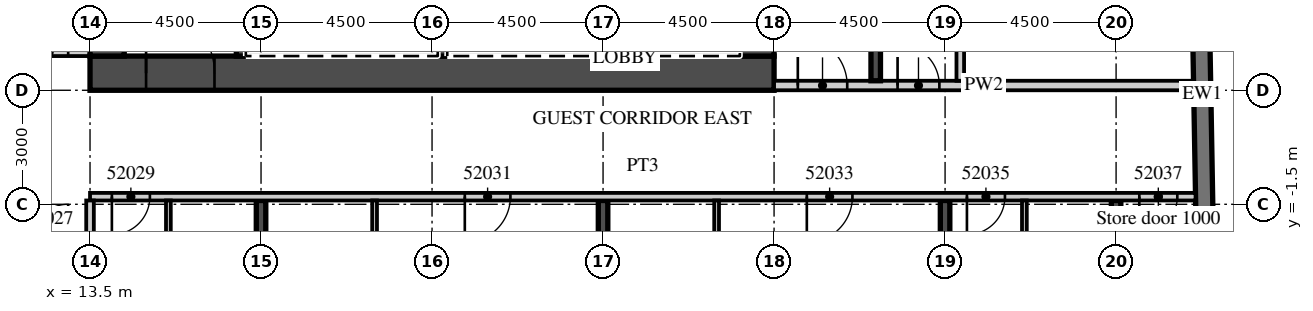
"""IFC4 building model, lengths in metres.
Left out: names, types, materials, properties, quantities, classifications, styles, units other than length and angle.
Written with IfcOpenShell. Run it as: python <this file> out.ifc"""

import sys

from ifc_helpers import new_model, si_unit, direction, frame, frame_2d, origin, place, context, subcontext, project, spatial, rectangle, extrude, element, fill, save


model = new_model("IFC4")
c1 = context("Model", 3, precision=1e-05, world=origin(), true_north=direction((0.0, 1.0)))
c2 = subcontext(c1, "Body", "Model", "MODEL_VIEW")
j1 = project(units=[si_unit("LENGTHUNIT", "METRE"), si_unit("PLANEANGLEUNIT", "RADIAN")], contexts=[c1])
p1 = place(None, origin())
s1 = spatial("IfcSite", under=j1, at=p1, CompositionType="ELEMENT")
p2 = place(p1, origin())
s2 = spatial("IfcBuilding", under=s1, at=p2, CompositionType="ELEMENT")
p3 = place(p2, frame((0.0, 0.0, 217.7)))
s3 = spatial("IfcBuildingStorey", under=s2, at=p3, CompositionType="ELEMENT", Elevation=217.7)
p4 = place(p3, frame((18.0, -19.079, 0.0), z_axis=(0.0, 0.0, 1.0), x_axis=(0.0, 1.0, 0.0)))
e1 = element("IfcWall", 1, at=p4, inside=s3, PredefinedType="SHEAR", context=c2, shape_type="SweptSolid", body=[
    extrude(rectangle(XDim=17.679, YDim=0.25, at=frame_2d((8.84, 0.0))), origin(), (0.0, 0.0, 1.0), 3.3),
])
p5 = place(p3, frame((27.0, -18.922, 0.0), z_axis=(0.0, 0.0, 1.0), x_axis=(0.0, 1.0, 0.0)))
e2 = element("IfcWall", 2, at=p5, inside=s3, PredefinedType="SHEAR", context=c2, shape_type="SweptSolid", body=[
    extrude(rectangle(XDim=17.522, YDim=0.25, at=frame_2d((8.761, 0.0))), origin(), (0.0, 0.0, 1.0), 3.3),
])
p6 = place(p3, frame((36.0, -18.765, 0.0), z_axis=(0.0, 0.0, 1.0), x_axis=(0.0, 1.0, 0.0)))
e3 = element("IfcWall", 3, at=p6, inside=s3, PredefinedType="SHEAR", context=c2, shape_type="SweptSolid", body=[
    extrude(rectangle(XDim=17.365, YDim=0.25, at=frame_2d((8.683, 0.0))), origin(), (0.0, 0.0, 1.0), 3.3),
])
p7 = place(p3, frame((40.5, -18.325, 0.0), z_axis=(0.0, 0.0, 1.0), x_axis=(0.0, 1.0, 0.0)))
e4 = element("IfcWall", 4, at=p7, inside=s3, PredefinedType="SHEAR", context=c2, shape_type="SweptSolid", body=[
    extrude(rectangle(XDim=16.925, YDim=0.25, at=frame_2d((8.463, 0.0))), origin(), (0.0, 0.0, 1.0), 3.3),
])
p8 = place(p3, frame((43.057, -15.103, 0.0), z_axis=(0.0, 0.0, 1.0), x_axis=(-0.017452408953, 0.999847695112, 0.0)))
e5 = element("IfcWall", 5, at=p8, inside=s3, PredefinedType="SOLIDWALL", context=c2, shape_type="SweptSolid", body=[
    extrude(rectangle(XDim=33.0, YDim=0.45, at=frame_2d((16.5, 0.0))), origin(), (0.0, 0.0, 1.0), 3.02),
])
p9 = place(p3, frame((-13.5, 2.5, 0.0), z_axis=(0.0, 0.0, 1.0), x_axis=(1.0, 0.0, 0.0)))
e6 = element("IfcWall", 6, at=p9, inside=s3, PredefinedType="PARTITIONING", context=c2, shape_type="SweptSolid", body=[
    extrude(rectangle(XDim=27.0, YDim=0.2, at=frame_2d((13.5, 0.0))), origin(), (0.0, 0.0, 1.0), 3.02),
])
p10 = place(p9, frame((2.925, 0.0, 0.0)))
e7 = element("IfcOpeningElement", 7, at=p10, cuts=e6, PredefinedType="OPENING", context=c2, shape_type="SweptSolid", body=[
    extrude(rectangle(XDim=1.0, YDim=2.1, at=frame_2d((0.5, 1.05))), frame((0.0, 0.11, 0.0), z_axis=(0.0, -1.0, 0.0), x_axis=(1.0, 0.0, 0.0)), (0.0, 0.0, 1.0), 0.22),
])
p11 = place(p9, frame((7.45, 0.0, 0.0)))
e8 = element("IfcOpeningElement", 8, at=p11, cuts=e6, PredefinedType="OPENING", context=c2, shape_type="SweptSolid", body=[
    extrude(rectangle(XDim=1.0, YDim=2.1, at=frame_2d((0.5, 1.05))), frame((0.0, 0.11, 0.0), z_axis=(0.0, -1.0, 0.0), x_axis=(1.0, 0.0, 0.0)), (0.0, 0.0, 1.0), 0.22),
])
p12 = place(p9, frame((11.925, 0.0, 0.0)))
e9 = element("IfcOpeningElement", 9, at=p12, cuts=e6, PredefinedType="OPENING", context=c2, shape_type="SweptSolid", body=[
    extrude(rectangle(XDim=1.0, YDim=2.1, at=frame_2d((0.5, 1.05))), frame((0.0, 0.11, 0.0), z_axis=(0.0, -1.0, 0.0), x_axis=(1.0, 0.0, 0.0)), (0.0, 0.0, 1.0), 0.22),
])
p13 = place(p9, frame((14.075, 0.0, 0.0)))
e10 = element("IfcOpeningElement", 10, at=p13, cuts=e6, PredefinedType="OPENING", context=c2, shape_type="SweptSolid", body=[
    extrude(rectangle(XDim=1.0, YDim=2.1, at=frame_2d((0.5, 1.05))), frame((0.0, 0.11, 0.0), z_axis=(0.0, -1.0, 0.0), x_axis=(1.0, 0.0, 0.0)), (0.0, 0.0, 1.0), 0.22),
])
p14 = place(p9, frame((20.925, 0.0, 0.0)))
e11 = element("IfcOpeningElement", 11, at=p14, cuts=e6, PredefinedType="OPENING", context=c2, shape_type="SweptSolid", body=[
    extrude(rectangle(XDim=1.0, YDim=2.1, at=frame_2d((0.5, 1.05))), frame((0.0, 0.11, 0.0), z_axis=(0.0, -1.0, 0.0), x_axis=(1.0, 0.0, 0.0)), (0.0, 0.0, 1.0), 0.22),
])
p15 = place(p9, frame((25.425, 0.0, 0.0)))
e12 = element("IfcOpeningElement", 12, at=p15, cuts=e6, PredefinedType="OPENING", context=c2, shape_type="SweptSolid", body=[
    extrude(rectangle(XDim=1.0, YDim=2.1, at=frame_2d((0.5, 1.05))), frame((0.0, 0.11, 0.0), z_axis=(0.0, -1.0, 0.0), x_axis=(1.0, 0.0, 0.0)), (0.0, 0.0, 1.0), 0.22),
])
p16 = place(p3, frame((13.5, -1.3, 0.0), z_axis=(0.0, 0.0, 1.0), x_axis=(1.0, 0.0, 0.0)))
e13 = element("IfcWall", 13, at=p16, inside=s3, PredefinedType="PARTITIONING", context=c2, shape_type="SweptSolid", body=[
    extrude(rectangle(XDim=29.091, YDim=0.2, at=frame_2d((14.545, 0.0))), origin(), (0.0, 0.0, 1.0), 3.02),
])
p17 = place(p16, frame((0.575, 0.0, 0.0)))
e14 = element("IfcOpeningElement", 14, at=p17, cuts=e13, PredefinedType="OPENING", context=c2, shape_type="SweptSolid", body=[
    extrude(rectangle(XDim=1.0, YDim=2.1, at=frame_2d((0.5, 1.05))), frame((0.0, 0.11, 0.0), z_axis=(0.0, -1.0, 0.0), x_axis=(1.0, 0.0, 0.0)), (0.0, 0.0, 1.0), 0.22),
])
p18 = place(p16, frame((9.862, 0.0, 0.0)))
e15 = element("IfcOpeningElement", 15, at=p18, cuts=e13, PredefinedType="OPENING", context=c2, shape_type="SweptSolid", body=[
    extrude(rectangle(XDim=1.2, YDim=2.1, at=frame_2d((0.6, 1.05))), frame((0.0, 0.11, 0.0), z_axis=(0.0, -1.0, 0.0), x_axis=(1.0, 0.0, 0.0)), (0.0, 0.0, 1.0), 0.22),
])
p19 = place(p16, frame((18.862, 0.0, 0.0)))
e16 = element("IfcOpeningElement", 16, at=p19, cuts=e13, PredefinedType="OPENING", context=c2, shape_type="SweptSolid", body=[
    extrude(rectangle(XDim=1.2, YDim=2.1, at=frame_2d((0.6, 1.05))), frame((0.0, 0.11, 0.0), z_axis=(0.0, -1.0, 0.0), x_axis=(1.0, 0.0, 0.0)), (0.0, 0.0, 1.0), 0.22),
])
p20 = place(p16, frame((23.075, 0.0, 0.0)))
e17 = element("IfcOpeningElement", 17, at=p20, cuts=e13, PredefinedType="OPENING", context=c2, shape_type="SweptSolid", body=[
    extrude(rectangle(XDim=1.0, YDim=2.1, at=frame_2d((0.5, 1.05))), frame((0.0, 0.11, 0.0), z_axis=(0.0, -1.0, 0.0), x_axis=(1.0, 0.0, 0.0)), (0.0, 0.0, 1.0), 0.22),
])
p21 = place(p16, frame((27.611, 0.0, 0.0)))
e18 = element("IfcOpeningElement", 18, at=p21, cuts=e13, PredefinedType="OPENING", context=c2, shape_type="SweptSolid", body=[
    extrude(rectangle(XDim=1.0, YDim=2.4, at=frame_2d((0.5, 1.2))), frame((0.0, 0.11, 0.0), z_axis=(0.0, -1.0, 0.0), x_axis=(1.0, 0.0, 0.0)), (0.0, 0.0, 1.0), 0.22),
])
p22 = place(p3, frame((13.5, -19.17, 0.0), z_axis=(0.0, 0.0, 1.0), x_axis=(0.0, 1.0, 0.0)))
e19 = element("IfcWall", 19, at=p22, inside=s3, PredefinedType="PARTITIONING", context=c2, shape_type="SweptSolid", body=[
    extrude(rectangle(XDim=17.77, YDim=0.2, at=frame_2d((8.885, 0.0))), origin(), (0.0, 0.0, 1.0), 3.02),
])
p23 = place(p3, frame((15.562, -8.125, 0.0), z_axis=(0.0, 0.0, 1.0), x_axis=(0.0, 1.0, 0.0)))
e20 = element("IfcWall", 20, at=p23, inside=s3, PredefinedType="PARTITIONING", context=c2, shape_type="SweptSolid", body=[
    extrude(rectangle(XDim=6.725, YDim=0.125, at=frame_2d((3.363, 0.0))), origin(), (0.0, 0.0, 1.0), 3.02),
])
p24 = place(p23, frame((3.375, 0.0, 0.0)))
e21 = element("IfcOpeningElement", 21, at=p24, cuts=e20, PredefinedType="OPENING", context=c2, shape_type="SweptSolid", body=[
    extrude(rectangle(XDim=0.9, YDim=2.1, at=frame_2d((0.45, 1.05))), frame((0.0, 0.073, 0.0), z_axis=(0.0, -1.0, 0.0), x_axis=(1.0, 0.0, 0.0)), (0.0, 0.0, 1.0), 0.145),
])
p25 = place(p3, frame((20.988, -8.125, 0.0), z_axis=(0.0, 0.0, 1.0), x_axis=(0.0, 1.0, 0.0)))
e22 = element("IfcWall", 22, at=p25, inside=s3, PredefinedType="PARTITIONING", context=c2, shape_type="SweptSolid", body=[
    extrude(rectangle(XDim=6.725, YDim=0.125, at=frame_2d((3.363, 0.0))), origin(), (0.0, 0.0, 1.0), 3.02),
])
p26 = place(p25, frame((3.375, 0.0, 0.0)))
e23 = element("IfcOpeningElement", 23, at=p26, cuts=e22, PredefinedType="OPENING", context=c2, shape_type="SweptSolid", body=[
    extrude(rectangle(XDim=0.9, YDim=2.1, at=frame_2d((0.45, 1.05))), frame((0.0, 0.073, 0.0), z_axis=(0.0, -1.0, 0.0), x_axis=(1.0, 0.0, 0.0)), (0.0, 0.0, 1.0), 0.145),
])
p27 = place(p3, frame((29.988, -8.125, 0.0), z_axis=(0.0, 0.0, 1.0), x_axis=(0.0, 1.0, 0.0)))
e24 = element("IfcWall", 24, at=p27, inside=s3, PredefinedType="PARTITIONING", context=c2, shape_type="SweptSolid", body=[
    extrude(rectangle(XDim=6.725, YDim=0.125, at=frame_2d((3.363, 0.0))), origin(), (0.0, 0.0, 1.0), 3.02),
])
p28 = place(p27, frame((3.375, 0.0, 0.0)))
e25 = element("IfcOpeningElement", 25, at=p28, cuts=e24, PredefinedType="OPENING", context=c2, shape_type="SweptSolid", body=[
    extrude(rectangle(XDim=0.9, YDim=2.1, at=frame_2d((0.45, 1.05))), frame((0.0, 0.073, 0.0), z_axis=(0.0, -1.0, 0.0), x_axis=(1.0, 0.0, 0.0)), (0.0, 0.0, 1.0), 0.145),
])
p29 = place(p3, frame((38.087, -8.125, 0.0), z_axis=(0.0, 0.0, 1.0), x_axis=(0.0, 1.0, 0.0)))
e26 = element("IfcWall", 26, at=p29, inside=s3, PredefinedType="PARTITIONING", context=c2, shape_type="SweptSolid", body=[
    extrude(rectangle(XDim=6.725, YDim=0.125, at=frame_2d((3.363, 0.0))), origin(), (0.0, 0.0, 1.0), 3.02),
])
p30 = place(p29, frame((3.375, 0.0, 0.0)))
e27 = element("IfcOpeningElement", 27, at=p30, cuts=e26, PredefinedType="OPENING", context=c2, shape_type="SweptSolid", body=[
    extrude(rectangle(XDim=0.9, YDim=2.1, at=frame_2d((0.45, 1.05))), frame((0.0, 0.073, 0.0), z_axis=(0.0, -1.0, 0.0), x_axis=(1.0, 0.0, 0.0)), (0.0, 0.0, 1.0), 0.145),
])
p31 = place(p3, frame((13.5, 1.95, 0.0), z_axis=(0.0, 0.0, 1.0), x_axis=(1.0, 0.0, 0.0)))
e28 = element("IfcWall", 28, at=p31, inside=s3, PredefinedType="SHEAR", context=c2, shape_type="SweptSolid", body=[
    extrude(rectangle(XDim=18.0, YDim=0.9, at=frame_2d((9.0, 0.0))), origin(), (0.0, 0.0, 1.0), 3.02),
])
p32 = place(p31, frame((1.475, 0.0, 0.0)))
e29 = element("IfcOpeningElement", 29, at=p32, cuts=e28, PredefinedType="OPENING", context=c2, shape_type="SweptSolid", body=[
    extrude(rectangle(XDim=1.8, YDim=2.1, at=frame_2d((0.9, 1.05))), frame((0.0, 0.46, 0.0), z_axis=(0.0, -1.0, 0.0), x_axis=(1.0, 0.0, 0.0)), (0.0, 0.0, 1.0), 0.92),
])
p33 = place(p3, frame((31.05, 2.4, 0.0), z_axis=(0.0, 0.0, 1.0), x_axis=(0.0, 1.0, 0.0)))
e30 = element("IfcWall", 30, at=p33, inside=s3, PredefinedType="SHEAR", context=c2, shape_type="SweptSolid", body=[
    extrude(rectangle(XDim=12.8, YDim=0.9, at=frame_2d((6.4, 0.0))), origin(), (0.0, 0.0, 1.0), 3.02),
])
p34 = place(p33, frame((0.2, 0.0, 0.0)))
e31 = element("IfcOpeningElement", 31, at=p34, cuts=e30, PredefinedType="OPENING", context=c2, shape_type="SweptSolid", body=[
    extrude(rectangle(XDim=1.1, YDim=2.1, at=frame_2d((0.55, 1.05))), frame((0.0, 0.46, 0.0), z_axis=(0.0, -1.0, 0.0), x_axis=(1.0, 0.0, 0.0)), (0.0, 0.0, 1.0), 0.92),
])
p35 = place(p3, frame((13.95, 2.4, 0.0), z_axis=(0.0, 0.0, 1.0), x_axis=(0.0, 1.0, 0.0)))
e32 = element("IfcWall", 32, at=p35, inside=s3, PredefinedType="SHEAR", context=c2, shape_type="SweptSolid", body=[
    extrude(rectangle(XDim=12.2, YDim=0.9, at=frame_2d((6.1, 0.0))), origin(), (0.0, 0.0, 1.0), 3.02),
])
p36 = place(p3, frame((17.475, 2.4, 0.0), z_axis=(0.0, 0.0, 1.0), x_axis=(0.0, 1.0, 0.0)))
e33 = element("IfcWall", 33, at=p36, inside=s3, PredefinedType="SHEAR", context=c2, shape_type="SweptSolid", body=[
    extrude(rectangle(XDim=3.15, YDim=0.25, at=frame_2d((1.575, 0.0))), origin(), (0.0, 0.0, 1.0), 3.02),
])
for number, where, z_axis, x_axis in (
    (34, (27.975, 2.4, 0.0), (0.0, 0.0, 1.0), (0.0, 1.0, 0.0)),
    (35, (22.775, 2.4, 0.0), (0.0, 0.0, 1.0), (0.0, 1.0, 0.0)),
):
    element("IfcWall", number, at=place(p3, frame(where, z_axis=z_axis, x_axis=x_axis)), inside=s3, PredefinedType="SHEAR", context=c2, shape_type="SweptSolid", body=[
        extrude(rectangle(XDim=2.9, YDim=0.25, at=frame_2d((1.45, 0.0))), origin(), (0.0, 0.0, 1.0), 3.02),
    ])
p37 = place(p3, frame((31.5, 1.625, 0.0), z_axis=(0.0, 0.0, 1.0), x_axis=(1.0, 0.0, 0.0)))
e36 = element("IfcWall", 36, at=p37, inside=s3, PredefinedType="PARTITIONING", context=c2, shape_type="SweptSolid", body=[
    extrude(rectangle(XDim=11.04, YDim=0.25, at=frame_2d((5.52, 0.0))), origin(), (0.0, 0.0, 1.0), 3.02),
])
p38 = place(p37, frame((0.625, 0.0, 0.0)))
e37 = element("IfcOpeningElement", 37, at=p38, cuts=e36, PredefinedType="OPENING", context=c2, shape_type="SweptSolid", body=[
    extrude(rectangle(XDim=1.3, YDim=2.1, at=frame_2d((0.65, 1.05))), frame((0.0, 0.135, 0.0), z_axis=(0.0, -1.0, 0.0), x_axis=(1.0, 0.0, 0.0)), (0.0, 0.0, 1.0), 0.27),
])
p39 = place(p37, frame((3.25, 0.0, 0.0)))
e38 = element("IfcOpeningElement", 38, at=p39, cuts=e36, PredefinedType="OPENING", context=c2, shape_type="SweptSolid", body=[
    extrude(rectangle(XDim=1.1, YDim=2.1, at=frame_2d((0.55, 1.05))), frame((0.0, 0.135, 0.0), z_axis=(0.0, -1.0, 0.0), x_axis=(1.0, 0.0, 0.0)), (0.0, 0.0, 1.0), 0.27),
])
p40 = place(p3, frame((34.175, 1.75, 0.0), z_axis=(0.0, 0.0, 1.0), x_axis=(0.0, 1.0, 0.0)))
e39 = element("IfcWall", 39, at=p40, inside=s3, PredefinedType="SHEAR", context=c2, shape_type="SweptSolid", body=[
    extrude(rectangle(XDim=8.35, YDim=0.25, at=frame_2d((4.175, 0.0))), origin(), (0.0, 0.0, 1.0), 3.02),
])
p41 = place(p3, frame((36.4, 1.75, 0.0), z_axis=(0.0, 0.0, 1.0), x_axis=(0.0, 1.0, 0.0)))
e40 = element("IfcWall", 40, at=p41, inside=s3, PredefinedType="PARTITIONING", context=c2, shape_type="SweptSolid", body=[
    extrude(rectangle(XDim=15.95, YDim=0.2, at=frame_2d((7.975, 0.0))), origin(), (0.0, 0.0, 1.0), 3.02),
])
p42 = place(p41, frame((14.7, 0.0, 0.0)))
e41 = element("IfcOpeningElement", 41, at=p42, cuts=e40, PredefinedType="OPENING", context=c2, shape_type="SweptSolid", body=[
    extrude(rectangle(XDim=0.9, YDim=2.1, at=frame_2d((0.45, 1.05))), frame((0.0, 0.11, 0.0), z_axis=(0.0, -1.0, 0.0), x_axis=(1.0, 0.0, 0.0)), (0.0, 0.0, 1.0), 0.22),
])
p43 = place(p15, origin())
e42 = element("IfcDoor", 42, at=p43, inside=s3, OperationType="SINGLE_SWING_LEFT", PredefinedType="DOOR", context=c2, shape_type="SweptSolid", body=[
    extrude(rectangle(XDim=1.0, YDim=2.1, at=frame_2d((0.5, 1.05))), frame((0.0, 0.025, 0.0), z_axis=(0.0, -1.0, 0.0), x_axis=(1.0, 0.0, 0.0)), (0.0, 0.0, 1.0), 0.05),
])
fill(e12, e42)
p44 = place(p17, origin())
e43 = element("IfcDoor", 43, at=p44, inside=s3, OperationType="SINGLE_SWING_LEFT", PredefinedType="DOOR", context=c2, shape_type="SweptSolid", body=[
    extrude(rectangle(XDim=1.0, YDim=2.1, at=frame_2d((0.5, 1.05))), frame((0.0, 0.025, 0.0), z_axis=(0.0, -1.0, 0.0), x_axis=(1.0, 0.0, 0.0)), (0.0, 0.0, 1.0), 0.05),
])
fill(e14, e43)
p45 = place(p18, origin())
e44 = element("IfcDoor", 44, at=p45, inside=s3, OperationType="SINGLE_SWING_LEFT", PredefinedType="DOOR", context=c2, shape_type="SweptSolid", body=[
    extrude(rectangle(XDim=1.2, YDim=2.1, at=frame_2d((0.6, 1.05))), frame((0.0, 0.025, 0.0), z_axis=(0.0, -1.0, 0.0), x_axis=(1.0, 0.0, 0.0)), (0.0, 0.0, 1.0), 0.05),
])
fill(e15, e44)
p46 = place(p19, origin())
e45 = element("IfcDoor", 45, at=p46, inside=s3, OperationType="SINGLE_SWING_LEFT", PredefinedType="DOOR", context=c2, shape_type="SweptSolid", body=[
    extrude(rectangle(XDim=1.2, YDim=2.1, at=frame_2d((0.6, 1.05))), frame((0.0, 0.025, 0.0), z_axis=(0.0, -1.0, 0.0), x_axis=(1.0, 0.0, 0.0)), (0.0, 0.0, 1.0), 0.05),
])
fill(e16, e45)
p47 = place(p20, origin())
e46 = element("IfcDoor", 46, at=p47, inside=s3, OperationType="SINGLE_SWING_LEFT", PredefinedType="DOOR", context=c2, shape_type="SweptSolid", body=[
    extrude(rectangle(XDim=1.0, YDim=2.1, at=frame_2d((0.5, 1.05))), frame((0.0, 0.025, 0.0), z_axis=(0.0, -1.0, 0.0), x_axis=(1.0, 0.0, 0.0)), (0.0, 0.0, 1.0), 0.05),
])
fill(e17, e46)
p48 = place(p21, origin())
e47 = element("IfcDoor", 47, at=p48, inside=s3, OperationType="SINGLE_SWING_LEFT", PredefinedType="DOOR", context=c2, shape_type="SweptSolid", body=[
    extrude(rectangle(XDim=1.0, YDim=2.4, at=frame_2d((0.5, 1.2))), frame((0.0, 0.025, 0.0), z_axis=(0.0, -1.0, 0.0), x_axis=(1.0, 0.0, 0.0)), (0.0, 0.0, 1.0), 0.05),
])
fill(e18, e47)
p49 = place(p32, origin())
e48 = element("IfcDoor", 48, at=p49, inside=s3, OperationType="DOUBLE_DOOR_DOUBLE_SWING", PredefinedType="DOOR", context=c2, shape_type="SweptSolid", body=[
    extrude(rectangle(XDim=1.8, YDim=2.1, at=frame_2d((0.9, 1.05))), frame((0.0, 0.025, 0.0), z_axis=(0.0, -1.0, 0.0), x_axis=(1.0, 0.0, 0.0)), (0.0, 0.0, 1.0), 0.05),
])
fill(e29, e48)
p50 = place(p38, origin())
e49 = element("IfcDoor", 49, at=p50, inside=s3, OperationType="SINGLE_SWING_LEFT", PredefinedType="DOOR", context=c2, shape_type="SweptSolid", body=[
    extrude(rectangle(XDim=1.3, YDim=2.1, at=frame_2d((0.65, 1.05))), frame((0.0, 0.025, 0.0), z_axis=(0.0, -1.0, 0.0), x_axis=(1.0, 0.0, 0.0)), (0.0, 0.0, 1.0), 0.05),
])
fill(e37, e49)
p51 = place(p39, origin())
e50 = element("IfcDoor", 50, at=p51, inside=s3, OperationType="SINGLE_SWING_LEFT", PredefinedType="DOOR", context=c2, shape_type="SweptSolid", body=[
    extrude(rectangle(XDim=1.1, YDim=2.1, at=frame_2d((0.55, 1.05))), frame((0.0, 0.025, 0.0), z_axis=(0.0, -1.0, 0.0), x_axis=(1.0, 0.0, 0.0)), (0.0, 0.0, 1.0), 0.05),
])
fill(e38, e50)
save(model, sys.argv[1])
